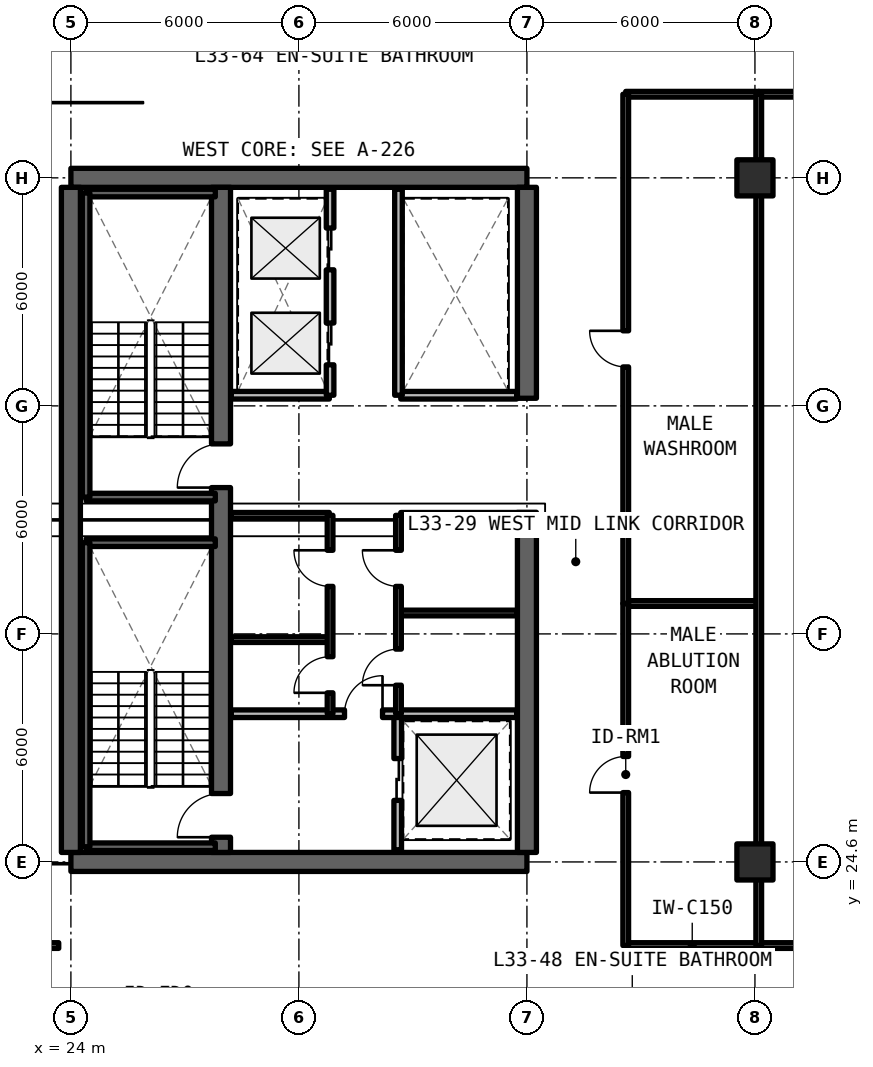
"""IFC4 building model, lengths in metres.
Left out: names, types, materials, properties, quantities, classifications, styles, units other than length and angle.
Written with IfcOpenShell. Run it as: python <this file> out.ifc"""

import sys

from ifc_helpers import new_model, si_unit, direction, frame, frame_2d, origin, origin_2d, place, context, subcontext, project, spatial, rectangle, extrude, element, fill, save


model = new_model("IFC4")
c1 = context("Model", 3, precision=1e-05, world=origin(), true_north=direction((0.0, 1.0)))
c2 = subcontext(c1, "Body", "Model", "MODEL_VIEW")
j1 = project(units=[si_unit("LENGTHUNIT", "METRE"), si_unit("PLANEANGLEUNIT", "RADIAN")], contexts=[c1])
p1 = place(None, origin())
s1 = spatial("IfcSite", under=j1, at=p1, CompositionType="ELEMENT")
p2 = place(p1, origin())
s2 = spatial("IfcBuilding", under=s1, at=p2, CompositionType="ELEMENT")
p3 = place(p2, frame((0.0, 0.0, 119.46)))
s3 = spatial("IfcBuildingStorey", under=s2, at=p3, CompositionType="ELEMENT", Elevation=119.46)
for number, where, z_axis, x_axis in (
    (1, (24.0, 24.6, 0.0), (0.0, 0.0, 1.0), (1.0, 0.0, 0.0)),
    (2, (36.0, 42.6, 0.0), (0.0, 0.0, 1.0), (-1.0, 0.0, 0.0)),
):
    element("IfcWall", number, at=place(p3, frame(where, z_axis=z_axis, x_axis=x_axis)), inside=s3, PredefinedType="SHEAR", context=c2, shape_type="SweptSolid", body=[
        extrude(rectangle(XDim=12.0, YDim=0.5, at=frame_2d((6.0, 0.0))), origin(), (0.0, 0.0, 1.0), 3.63),
    ])
p4 = place(p3, frame((24.0, 24.85, 0.0), z_axis=(0.0, 0.0, 1.0), x_axis=(0.0, 1.0, 0.0)))
e3 = element("IfcWall", 3, at=p4, inside=s3, PredefinedType="SHEAR", context=c2, shape_type="SweptSolid", body=[
    extrude(rectangle(XDim=17.5, YDim=0.5, at=frame_2d((8.75, 0.0))), origin(), (0.0, 0.0, 1.0), 3.63),
])
p5 = place(p3, frame((36.0, 24.85, 0.0), z_axis=(0.0, 0.0, 1.0), x_axis=(0.0, 1.0, 0.0)))
e4 = element("IfcWall", 4, at=p5, inside=s3, PredefinedType="SHEAR", context=c2, shape_type="SweptSolid", body=[
    extrude(rectangle(XDim=8.95, YDim=0.5, at=frame_2d((4.475, 0.0))), origin(), (0.0, 0.0, 1.0), 3.63),
])
p6 = place(p3, frame((36.0, 36.8, 0.0), z_axis=(0.0, 0.0, 1.0), x_axis=(0.0, 1.0, 0.0)))
e5 = element("IfcWall", 5, at=p6, inside=s3, PredefinedType="SHEAR", context=c2, shape_type="SweptSolid", body=[
    extrude(rectangle(XDim=5.55, YDim=0.5, at=frame_2d((2.775, 0.0))), origin(), (0.0, 0.0, 1.0), 3.63),
])
p7 = place(p3, frame((27.95, 24.85, 0.0), z_axis=(0.0, 0.0, 1.0), x_axis=(0.0, 1.0, 0.0)))
e6 = element("IfcWall", 6, at=p7, inside=s3, PredefinedType="SHEAR", context=c2, shape_type="SweptSolid", body=[
    extrude(rectangle(XDim=17.5, YDim=0.5, at=frame_2d((8.75, 0.0))), origin(), (0.0, 0.0, 1.0), 3.63),
])
p8 = place(p7, frame((0.4, 0.0, 0.0)))
e7 = element("IfcOpeningElement", 7, at=p8, cuts=e6, PredefinedType="OPENING", context=c2, shape_type="SweptSolid", body=[
    extrude(rectangle(XDim=1.15, YDim=2.15, at=frame_2d((0.575, 1.075))), frame((0.0, 0.26, 0.0), z_axis=(0.0, -1.0, 0.0), x_axis=(1.0, 0.0, 0.0)), (0.0, 0.0, 1.0), 0.52),
])
p9 = place(p7, frame((9.6, 0.0, 0.0)))
e8 = element("IfcOpeningElement", 8, at=p9, cuts=e6, PredefinedType="OPENING", context=c2, shape_type="SweptSolid", body=[
    extrude(rectangle(XDim=1.15, YDim=2.15, at=frame_2d((0.575, 1.075))), frame((0.0, 0.26, 0.0), z_axis=(0.0, -1.0, 0.0), x_axis=(1.0, 0.0, 0.0)), (0.0, 0.0, 1.0), 0.52),
])
for number, where, z_axis, x_axis in (
    (9, (42.0, 24.6, 0.0), (0.0, 0.0, 1.0), (1.0, 0.0, 0.0)),
    (10, (42.0, 42.6, 0.0), (0.0, 0.0, 1.0), (1.0, 0.0, 0.0)),
):
    element("IfcColumn", number, at=place(p3, frame(where, z_axis=z_axis, x_axis=x_axis)), inside=s3, PredefinedType="COLUMN", context=c2, shape_type="SweptSolid", body=[
        extrude(rectangle(XDim=0.95, YDim=0.95, at=origin_2d()), origin(), (0.0, 0.0, 1.0), 3.63),
    ])
p10 = place(p3, frame((32.6, 24.92, 0.0), z_axis=(0.0, 0.0, 1.0), x_axis=(0.0, 1.0, 0.0)))
e11 = element("IfcWall", 11, at=p10, inside=s3, PredefinedType="SOLIDWALL", context=c2, shape_type="SweptSolid", body=[
    extrude(rectangle(XDim=3.58, YDim=0.2, at=frame_2d((1.79, 0.0))), origin(), (0.0, 0.0, 1.0), 2.57),
])
p11 = place(p10, frame((1.3, 0.0, 0.0)))
e12 = element("IfcOpeningElement", 12, at=p11, cuts=e11, PredefinedType="OPENING", context=c2, shape_type="SweptSolid", body=[
    extrude(rectangle(XDim=1.1, YDim=2.2, at=frame_2d((0.55, 1.1))), frame((0.0, 0.11, 0.0), z_axis=(0.0, -1.0, 0.0), x_axis=(1.0, 0.0, 0.0)), (0.0, 0.0, 1.0), 0.22),
])
p12 = place(p3, frame((28.22, 28.5, 0.0), z_axis=(0.0, 0.0, 1.0), x_axis=(1.0, 0.0, 0.0)))
e13 = element("IfcWall", 13, at=p12, inside=s3, PredefinedType="SOLIDWALL", context=c2, shape_type="SweptSolid", body=[
    extrude(rectangle(XDim=7.51, YDim=0.2, at=frame_2d((3.755, 0.0))), origin(), (0.0, 0.0, 1.0), 2.57),
])
p13 = place(p12, frame((2.98, 0.0, 0.0)))
e14 = element("IfcOpeningElement", 14, at=p13, cuts=e13, PredefinedType="OPENING", context=c2, shape_type="SweptSolid", body=[
    extrude(rectangle(XDim=1.0, YDim=2.15, at=frame_2d((0.5, 1.075))), frame((0.0, 0.11, 0.0), z_axis=(0.0, -1.0, 0.0), x_axis=(1.0, 0.0, 0.0)), (0.0, 0.0, 1.0), 0.22),
])
for number, where, z_axis, x_axis in (
    (15, (28.22, 30.45, 0.0), (0.0, 0.0, 1.0), (1.0, 0.0, 0.0)),
    (16, (28.22, 33.72, 0.0), (0.0, 0.0, 1.0), (1.0, 0.0, 0.0)),
):
    element("IfcWall", number, at=place(p3, frame(where, z_axis=z_axis, x_axis=x_axis)), inside=s3, PredefinedType="SOLIDWALL", context=c2, shape_type="SweptSolid", body=[
        extrude(rectangle(XDim=2.58, YDim=0.15, at=frame_2d((1.29, 0.0))), origin(), (0.0, 0.0, 1.0), 2.57),
    ])
p14 = place(p3, frame((30.82, 28.5, 0.0), z_axis=(0.0, 0.0, 1.0), x_axis=(0.0, 1.0, 0.0)))
e17 = element("IfcWall", 17, at=p14, inside=s3, PredefinedType="SOLIDWALL", context=c2, shape_type="SweptSolid", body=[
    extrude(rectangle(XDim=5.22, YDim=0.15, at=frame_2d((2.61, 0.0))), origin(), (0.0, 0.0, 1.0), 2.57),
])
p15 = place(p14, frame((0.55, 0.0, 0.0)))
e18 = element("IfcOpeningElement", 18, at=p15, cuts=e17, PredefinedType="OPENING", context=c2, shape_type="SweptSolid", body=[
    extrude(rectangle(XDim=0.95, YDim=2.15, at=frame_2d((0.475, 1.075))), frame((0.0, 0.085, 0.0), z_axis=(0.0, -1.0, 0.0), x_axis=(1.0, 0.0, 0.0)), (0.0, 0.0, 1.0), 0.17),
])
p16 = place(p14, frame((3.35, 0.0, 0.0)))
e19 = element("IfcOpeningElement", 19, at=p16, cuts=e17, PredefinedType="OPENING", context=c2, shape_type="SweptSolid", body=[
    extrude(rectangle(XDim=0.95, YDim=2.15, at=frame_2d((0.475, 1.075))), frame((0.0, 0.085, 0.0), z_axis=(0.0, -1.0, 0.0), x_axis=(1.0, 0.0, 0.0)), (0.0, 0.0, 1.0), 0.17),
])
for number, where, z_axis, x_axis in (
    (20, (32.68, 31.15, 0.0), (0.0, 0.0, 1.0), (1.0, 0.0, 0.0)),
    (21, (32.68, 33.72, 0.0), (0.0, 0.0, 1.0), (1.0, 0.0, 0.0)),
):
    element("IfcWall", number, at=place(p3, frame(where, z_axis=z_axis, x_axis=x_axis)), inside=s3, PredefinedType="SOLIDWALL", context=c2, shape_type="SweptSolid", body=[
        extrude(rectangle(XDim=3.05, YDim=0.15, at=frame_2d((1.525, 0.0))), origin(), (0.0, 0.0, 1.0), 2.57),
    ])
p17 = place(p3, frame((32.62, 28.5, 0.0), z_axis=(0.0, 0.0, 1.0), x_axis=(0.0, 1.0, 0.0)))
e22 = element("IfcWall", 22, at=p17, inside=s3, PredefinedType="SOLIDWALL", context=c2, shape_type="SweptSolid", body=[
    extrude(rectangle(XDim=5.22, YDim=0.15, at=frame_2d((2.61, 0.0))), origin(), (0.0, 0.0, 1.0), 2.57),
])
p18 = place(p17, frame((0.75, 0.0, 0.0)))
e23 = element("IfcOpeningElement", 23, at=p18, cuts=e22, PredefinedType="OPENING", context=c2, shape_type="SweptSolid", body=[
    extrude(rectangle(XDim=0.95, YDim=2.15, at=frame_2d((0.475, 1.075))), frame((0.0, 0.085, 0.0), z_axis=(0.0, -1.0, 0.0), x_axis=(1.0, 0.0, 0.0)), (0.0, 0.0, 1.0), 0.17),
])
p19 = place(p17, frame((3.35, 0.0, 0.0)))
e24 = element("IfcOpeningElement", 24, at=p19, cuts=e22, PredefinedType="OPENING", context=c2, shape_type="SweptSolid", body=[
    extrude(rectangle(XDim=0.95, YDim=2.15, at=frame_2d((0.475, 1.075))), frame((0.0, 0.085, 0.0), z_axis=(0.0, -1.0, 0.0), x_axis=(1.0, 0.0, 0.0)), (0.0, 0.0, 1.0), 0.17),
])
p20 = place(p3, frame((28.22, 36.88, 0.0), z_axis=(0.0, 0.0, 1.0), x_axis=(1.0, 0.0, 0.0)))
e25 = element("IfcWall", 25, at=p20, inside=s3, PredefinedType="SOLIDWALL", context=c2, shape_type="SweptSolid", body=[
    extrude(rectangle(XDim=2.58, YDim=0.2, at=frame_2d((1.29, 0.0))), origin(), (0.0, 0.0, 1.0), 2.57),
])
p21 = place(p3, frame((30.82, 36.88, 0.0), z_axis=(0.0, 0.0, 1.0), x_axis=(0.0, 1.0, 0.0)))
e26 = element("IfcWall", 26, at=p21, inside=s3, PredefinedType="SOLIDWALL", context=c2, shape_type="SweptSolid", body=[
    extrude(rectangle(XDim=5.42, YDim=0.2, at=frame_2d((2.71, 0.0))), origin(), (0.0, 0.0, 1.0), 2.57),
])
p22 = place(p21, frame((0.8, 0.0, 0.0)))
e27 = element("IfcOpeningElement", 27, at=p22, cuts=e26, PredefinedType="OPENING", context=c2, shape_type="SweptSolid", body=[
    extrude(rectangle(XDim=1.1, YDim=2.2, at=frame_2d((0.55, 1.1))), frame((0.0, 0.11, 0.0), z_axis=(0.0, -1.0, 0.0), x_axis=(1.0, 0.0, 0.0)), (0.0, 0.0, 1.0), 0.22),
])
p23 = place(p21, frame((3.3, 0.0, 0.0)))
e28 = element("IfcOpeningElement", 28, at=p23, cuts=e26, PredefinedType="OPENING", context=c2, shape_type="SweptSolid", body=[
    extrude(rectangle(XDim=1.1, YDim=2.2, at=frame_2d((0.55, 1.1))), frame((0.0, 0.11, 0.0), z_axis=(0.0, -1.0, 0.0), x_axis=(1.0, 0.0, 0.0)), (0.0, 0.0, 1.0), 0.22),
])
p24 = place(p3, frame((32.68, 36.88, 0.0), z_axis=(0.0, 0.0, 1.0), x_axis=(1.0, 0.0, 0.0)))
e29 = element("IfcWall", 29, at=p24, inside=s3, PredefinedType="SOLIDWALL", context=c2, shape_type="SweptSolid", body=[
    extrude(rectangle(XDim=3.05, YDim=0.2, at=frame_2d((1.525, 0.0))), origin(), (0.0, 0.0, 1.0), 2.57),
])
p25 = place(p3, frame((32.62, 36.88, 0.0), z_axis=(0.0, 0.0, 1.0), x_axis=(0.0, 1.0, 0.0)))
e30 = element("IfcWall", 30, at=p25, inside=s3, PredefinedType="SOLIDWALL", context=c2, shape_type="SweptSolid", body=[
    extrude(rectangle(XDim=5.42, YDim=0.2, at=frame_2d((2.71, 0.0))), origin(), (0.0, 0.0, 1.0), 2.57),
])
for number, where, z_axis, x_axis in (
    (31, (38.6, 22.4, 0.0), (0.0, 0.0, 1.0), (1.0, 0.0, 0.0)),
    (32, (38.6, 31.4, 0.0), (0.0, 0.0, 1.0), (1.0, 0.0, 0.0)),
):
    element("IfcWall", number, at=place(p3, frame(where, z_axis=z_axis, x_axis=x_axis)), inside=s3, PredefinedType="SOLIDWALL", context=c2, shape_type="SweptSolid", body=[
        extrude(rectangle(XDim=3.5, YDim=0.15, at=frame_2d((1.75, 0.0))), origin(), (0.0, 0.0, 1.0), 2.57),
    ])
p26 = place(p3, frame((38.6, 22.4, 0.0), z_axis=(0.0, 0.0, 1.0), x_axis=(0.0, 1.0, 0.0)))
e33 = element("IfcWall", 33, at=p26, inside=s3, PredefinedType="SOLIDWALL", context=c2, shape_type="SweptSolid", body=[
    extrude(rectangle(XDim=9.0, YDim=0.15, at=frame_2d((4.5, 0.0))), origin(), (0.0, 0.0, 1.0), 2.57),
])
p27 = place(p26, frame((4.025, 0.0, 0.0)))
e34 = element("IfcOpeningElement", 34, at=p27, cuts=e33, PredefinedType="OPENING", context=c2, shape_type="SweptSolid", body=[
    extrude(rectangle(XDim=0.95, YDim=2.15, at=frame_2d((0.475, 1.075))), frame((0.0, 0.085, 0.0), z_axis=(0.0, -1.0, 0.0), x_axis=(1.0, 0.0, 0.0)), (0.0, 0.0, 1.0), 0.17),
])
p28 = place(p3, frame((38.6, 44.8, 0.0), z_axis=(0.0, 0.0, 1.0), x_axis=(1.0, 0.0, 0.0)))
e35 = element("IfcWall", 35, at=p28, inside=s3, PredefinedType="SOLIDWALL", context=c2, shape_type="SweptSolid", body=[
    extrude(rectangle(XDim=3.5, YDim=0.15, at=frame_2d((1.75, 0.0))), origin(), (0.0, 0.0, 1.0), 2.57),
])
p29 = place(p3, frame((38.6, 31.4, 0.0), z_axis=(0.0, 0.0, 1.0), x_axis=(0.0, 1.0, 0.0)))
e36 = element("IfcWall", 36, at=p29, inside=s3, PredefinedType="SOLIDWALL", context=c2, shape_type="SweptSolid", body=[
    extrude(rectangle(XDim=13.4, YDim=0.15, at=frame_2d((6.7, 0.0))), origin(), (0.0, 0.0, 1.0), 2.57),
])
p30 = place(p29, frame((6.225, 0.0, 0.0)))
e37 = element("IfcOpeningElement", 37, at=p30, cuts=e36, PredefinedType="OPENING", context=c2, shape_type="SweptSolid", body=[
    extrude(rectangle(XDim=0.95, YDim=2.15, at=frame_2d((0.475, 1.075))), frame((0.0, 0.085, 0.0), z_axis=(0.0, -1.0, 0.0), x_axis=(1.0, 0.0, 0.0)), (0.0, 0.0, 1.0), 0.17),
])
p31 = place(p3, frame((42.1, 22.4, 0.0), z_axis=(0.0, 0.0, 1.0), x_axis=(1.0, 0.0, 0.0)))
e38 = element("IfcWall", 38, at=p31, inside=s3, PredefinedType="SOLIDWALL", context=c2, shape_type="SweptSolid", body=[
    extrude(rectangle(XDim=29.0, YDim=0.15, at=frame_2d((14.5, 0.0))), origin(), (0.0, 0.0, 1.0), 2.57),
])
p32 = place(p31, frame((13.8, 0.0, 0.0)))
e39 = element("IfcOpeningElement", 39, at=p32, cuts=e38, PredefinedType="OPENING", context=c2, shape_type="SweptSolid", body=[
    extrude(rectangle(XDim=1.4, YDim=2.15, at=frame_2d((0.7, 1.075))), frame((0.0, 0.085, 0.0), z_axis=(0.0, -1.0, 0.0), x_axis=(1.0, 0.0, 0.0)), (0.0, 0.0, 1.0), 0.17),
])
p33 = place(p3, frame((42.1, 44.8, 0.0), z_axis=(0.0, 0.0, 1.0), x_axis=(1.0, 0.0, 0.0)))
e40 = element("IfcWall", 40, at=p33, inside=s3, PredefinedType="SOLIDWALL", context=c2, shape_type="SweptSolid", body=[
    extrude(rectangle(XDim=29.0, YDim=0.15, at=frame_2d((14.5, 0.0))), origin(), (0.0, 0.0, 1.0), 2.57),
])
p34 = place(p3, frame((42.1, 22.4, 0.0), z_axis=(0.0, 0.0, 1.0), x_axis=(0.0, 1.0, 0.0)))
e41 = element("IfcWall", 41, at=p34, inside=s3, PredefinedType="SOLIDWALL", context=c2, shape_type="SweptSolid", body=[
    extrude(rectangle(XDim=22.4, YDim=0.15, at=frame_2d((11.2, 0.0))), origin(), (0.0, 0.0, 1.0), 2.57),
])
p35 = place(p3, frame((17.41, 22.4, 0.0), z_axis=(0.0, 0.0, 1.0), x_axis=(1.0, 0.0, 0.0)))
e42 = element("IfcWall", 42, at=p35, inside=s3, PredefinedType="SOLIDWALL", context=c2, shape_type="SweptSolid", body=[
    extrude(rectangle(XDim=6.27, YDim=0.15, at=frame_2d((3.135, 0.0))), origin(), (0.0, 0.0, 1.0), 2.57),
])
p36 = place(p35, frame((2.66, 0.0, 0.0)))
e43 = element("IfcOpeningElement", 43, at=p36, cuts=e42, PredefinedType="OPENING", context=c2, shape_type="SweptSolid", body=[
    extrude(rectangle(XDim=0.95, YDim=2.15, at=frame_2d((0.475, 1.075))), frame((0.0, 0.085, 0.0), z_axis=(0.0, -1.0, 0.0), x_axis=(1.0, 0.0, 0.0)), (0.0, 0.0, 1.0), 0.17),
])
for number, where, z_axis, x_axis in (
    (44, (24.4, 25.0, 0.0), (0.0, 0.0, 1.0), (1.0, 0.0, 0.0)),
    (45, (27.8, 33.0, 0.0), (0.0, 0.0, 1.0), (-1.0, 0.0, 0.0)),
):
    element("IfcWall", number, at=place(p3, frame(where, z_axis=z_axis, x_axis=x_axis)), inside=s3, PredefinedType="SOLIDWALL", context=c2, shape_type="SweptSolid", body=[
        extrude(rectangle(XDim=3.4, YDim=0.2, at=frame_2d((1.7, 0.0))), origin(), (0.0, 0.0, 1.0), 3.63),
    ])
p37 = place(p3, frame((24.4, 33.0, 0.0), z_axis=(0.0, 0.0, 1.0), x_axis=(0.0, -1.0, 0.0)))
e46 = element("IfcWall", 46, at=p37, inside=s3, PredefinedType="SOLIDWALL", context=c2, shape_type="SweptSolid", body=[
    extrude(rectangle(XDim=8.0, YDim=0.2, at=frame_2d((4.0, 0.0))), origin(), (0.0, 0.0, 1.0), 3.63),
])
for number, where, z_axis, x_axis in (
    (47, (24.4, 34.2, 0.0), (0.0, 0.0, 1.0), (1.0, 0.0, 0.0)),
    (48, (27.8, 42.2, 0.0), (0.0, 0.0, 1.0), (-1.0, 0.0, 0.0)),
):
    element("IfcWall", number, at=place(p3, frame(where, z_axis=z_axis, x_axis=x_axis)), inside=s3, PredefinedType="SOLIDWALL", context=c2, shape_type="SweptSolid", body=[
        extrude(rectangle(XDim=3.4, YDim=0.2, at=frame_2d((1.7, 0.0))), origin(), (0.0, 0.0, 1.0), 3.63),
    ])
p38 = place(p3, frame((24.4, 42.2, 0.0), z_axis=(0.0, 0.0, 1.0), x_axis=(0.0, -1.0, 0.0)))
e49 = element("IfcWall", 49, at=p38, inside=s3, PredefinedType="SOLIDWALL", context=c2, shape_type="SweptSolid", body=[
    extrude(rectangle(XDim=8.0, YDim=0.2, at=frame_2d((4.0, 0.0))), origin(), (0.0, 0.0, 1.0), 3.63),
])
p39 = place(p11, origin())
e50 = element("IfcDoor", 50, at=p39, inside=s3, OperationType="SLIDING_TO_LEFT", PredefinedType="DOOR", context=c2, shape_type="SweptSolid", body=[
    extrude(rectangle(XDim=1.1, YDim=2.2, at=frame_2d((0.55, 1.1))), frame((0.0, 0.025, 0.0), z_axis=(0.0, -1.0, 0.0), x_axis=(1.0, 0.0, 0.0)), (0.0, 0.0, 1.0), 0.05),
])
fill(e12, e50)
p40 = place(p13, origin())
e51 = element("IfcDoor", 51, at=p40, inside=s3, OperationType="SINGLE_SWING_RIGHT", PredefinedType="DOOR", context=c2, shape_type="SweptSolid", body=[
    extrude(rectangle(XDim=1.0, YDim=2.15, at=frame_2d((0.5, 1.075))), frame((0.0, 0.025, 0.0), z_axis=(0.0, -1.0, 0.0), x_axis=(1.0, 0.0, 0.0)), (0.0, 0.0, 1.0), 0.05),
])
fill(e14, e51)
p41 = place(p15, origin())
e52 = element("IfcDoor", 52, at=p41, inside=s3, OperationType="SINGLE_SWING_LEFT", PredefinedType="DOOR", context=c2, shape_type="SweptSolid", body=[
    extrude(rectangle(XDim=0.95, YDim=2.15, at=frame_2d((0.475, 1.075))), frame((0.0, 0.025, 0.0), z_axis=(0.0, -1.0, 0.0), x_axis=(1.0, 0.0, 0.0)), (0.0, 0.0, 1.0), 0.05),
])
fill(e18, e52)
p42 = place(p16, origin())
e53 = element("IfcDoor", 53, at=p42, inside=s3, OperationType="SINGLE_SWING_RIGHT", PredefinedType="DOOR", context=c2, shape_type="SweptSolid", body=[
    extrude(rectangle(XDim=0.95, YDim=2.15, at=frame_2d((0.475, 1.075))), frame((0.0, 0.025, 0.0), z_axis=(0.0, -1.0, 0.0), x_axis=(1.0, 0.0, 0.0)), (0.0, 0.0, 1.0), 0.05),
])
fill(e19, e53)
p43 = place(p18, origin())
e54 = element("IfcDoor", 54, at=p43, inside=s3, OperationType="SINGLE_SWING_LEFT", PredefinedType="DOOR", context=c2, shape_type="SweptSolid", body=[
    extrude(rectangle(XDim=0.95, YDim=2.15, at=frame_2d((0.475, 1.075))), frame((0.0, 0.025, 0.0), z_axis=(0.0, -1.0, 0.0), x_axis=(1.0, 0.0, 0.0)), (0.0, 0.0, 1.0), 0.05),
])
fill(e23, e54)
p44 = place(p19, origin())
e55 = element("IfcDoor", 55, at=p44, inside=s3, OperationType="SINGLE_SWING_RIGHT", PredefinedType="DOOR", context=c2, shape_type="SweptSolid", body=[
    extrude(rectangle(XDim=0.95, YDim=2.15, at=frame_2d((0.475, 1.075))), frame((0.0, 0.025, 0.0), z_axis=(0.0, -1.0, 0.0), x_axis=(1.0, 0.0, 0.0)), (0.0, 0.0, 1.0), 0.05),
])
fill(e24, e55)
p45 = place(p22, origin())
e56 = element("IfcDoor", 56, at=p45, inside=s3, OperationType="SLIDING_TO_LEFT", PredefinedType="DOOR", context=c2, shape_type="SweptSolid", body=[
    extrude(rectangle(XDim=1.1, YDim=2.2, at=frame_2d((0.55, 1.1))), frame((0.0, 0.025, 0.0), z_axis=(0.0, -1.0, 0.0), x_axis=(1.0, 0.0, 0.0)), (0.0, 0.0, 1.0), 0.05),
])
fill(e27, e56)
p46 = place(p23, origin())
e57 = element("IfcDoor", 57, at=p46, inside=s3, OperationType="SLIDING_TO_RIGHT", PredefinedType="DOOR", context=c2, shape_type="SweptSolid", body=[
    extrude(rectangle(XDim=1.1, YDim=2.2, at=frame_2d((0.55, 1.1))), frame((0.0, 0.025, 0.0), z_axis=(0.0, -1.0, 0.0), x_axis=(1.0, 0.0, 0.0)), (0.0, 0.0, 1.0), 0.05),
])
fill(e28, e57)
p47 = place(p27, origin())
e58 = element("IfcDoor", 58, at=p47, inside=s3, OperationType="SINGLE_SWING_LEFT", PredefinedType="DOOR", context=c2, shape_type="SweptSolid", body=[
    extrude(rectangle(XDim=0.95, YDim=2.15, at=frame_2d((0.475, 1.075))), frame((0.0, 0.025, 0.0), z_axis=(0.0, -1.0, 0.0), x_axis=(1.0, 0.0, 0.0)), (0.0, 0.0, 1.0), 0.05),
])
fill(e34, e58)
p48 = place(p30, origin())
e59 = element("IfcDoor", 59, at=p48, inside=s3, OperationType="SINGLE_SWING_RIGHT", PredefinedType="DOOR", context=c2, shape_type="SweptSolid", body=[
    extrude(rectangle(XDim=0.95, YDim=2.15, at=frame_2d((0.475, 1.075))), frame((0.0, 0.025, 0.0), z_axis=(0.0, -1.0, 0.0), x_axis=(1.0, 0.0, 0.0)), (0.0, 0.0, 1.0), 0.05),
])
fill(e37, e59)
p49 = place(p8, origin())
e60 = element("IfcDoor", 60, at=p49, inside=s3, OperationType="SINGLE_SWING_RIGHT", PredefinedType="DOOR", context=c2, shape_type="SweptSolid", body=[
    extrude(rectangle(XDim=1.15, YDim=2.15, at=frame_2d((0.575, 1.075))), frame((0.0, 0.025, 0.0), z_axis=(0.0, -1.0, 0.0), x_axis=(1.0, 0.0, 0.0)), (0.0, 0.0, 1.0), 0.05),
])
fill(e7, e60)
p50 = place(p9, origin())
e61 = element("IfcDoor", 61, at=p50, inside=s3, OperationType="SINGLE_SWING_LEFT", PredefinedType="DOOR", context=c2, shape_type="SweptSolid", body=[
    extrude(rectangle(XDim=1.15, YDim=2.15, at=frame_2d((0.575, 1.075))), frame((0.0, 0.025, 0.0), z_axis=(0.0, -1.0, 0.0), x_axis=(1.0, 0.0, 0.0)), (0.0, 0.0, 1.0), 0.05),
])
fill(e8, e61)
save(model, sys.argv[1])
